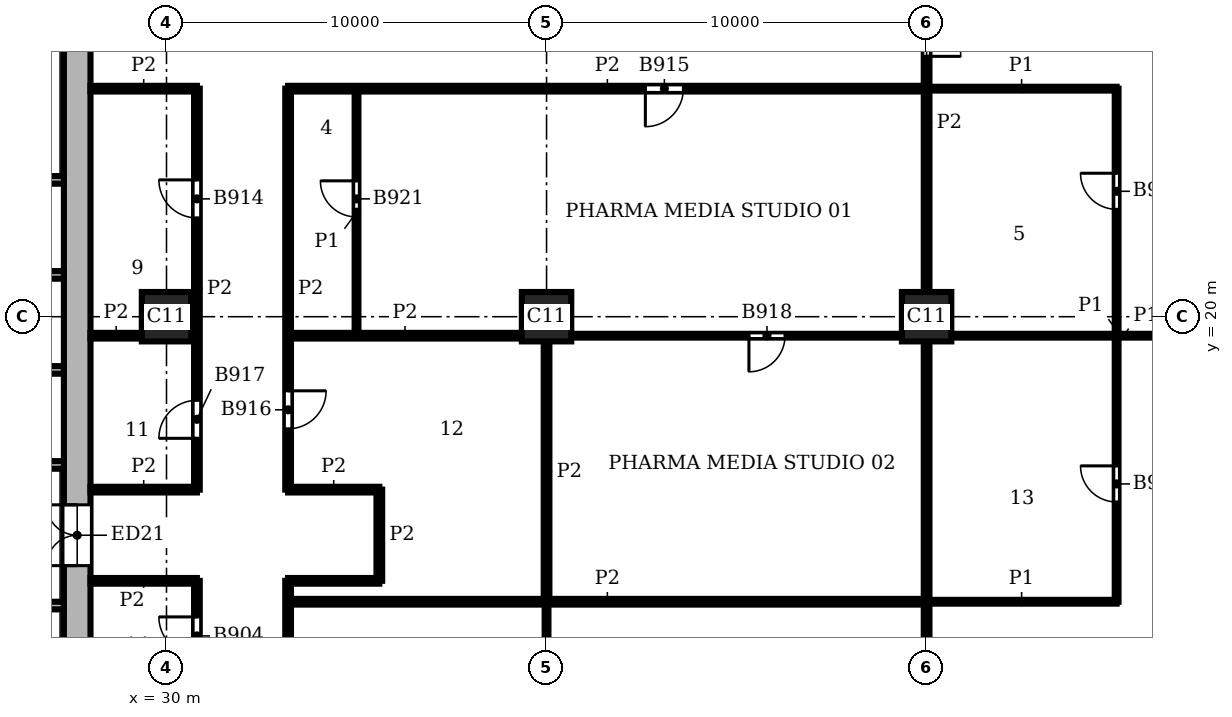
"""IFC4 building model, lengths in metres.
Left out: names, types, materials, properties, quantities, classifications, styles, units other than length and angle.
Written with IfcOpenShell. Run it as: python <this file> out.ifc"""

import sys

from ifc_helpers import new_model, si_unit, direction, frame, frame_2d, origin, origin_2d, place, context, subcontext, project, spatial, rectangle, extrude, element, fill, save


model = new_model("IFC4")
c1 = context("Model", 3, precision=1e-05, world=origin(), true_north=direction((0.0, 1.0)))
c2 = subcontext(c1, "Body", "Model", "MODEL_VIEW")
j1 = project(units=[si_unit("LENGTHUNIT", "METRE"), si_unit("PLANEANGLEUNIT", "RADIAN")], contexts=[c1])
p1 = place(None, origin())
s1 = spatial("IfcSite", under=j1, at=p1, CompositionType="ELEMENT")
p2 = place(p1, origin())
s2 = spatial("IfcBuilding", under=s1, at=p2, CompositionType="ELEMENT")
p3 = place(p2, frame((0.0, 0.0, 233.1)))
s3 = spatial("IfcBuildingStorey", under=s2, at=p3, CompositionType="ELEMENT", Elevation=233.1)
for number, where, z_axis, x_axis in (
    (1, (30.0, 20.0, 0.0), (0.0, 0.0, 1.0), (1.0, 0.0, 0.0)),
    (2, (40.0, 20.0, 0.0), (0.0, 0.0, 1.0), (1.0, 0.0, 0.0)),
    (3, (50.0, 20.0, 0.0), (0.0, 0.0, 1.0), (1.0, 0.0, 0.0)),
):
    element("IfcColumn", number, at=place(p3, frame(where, z_axis=z_axis, x_axis=x_axis)), inside=s3, PredefinedType="COLUMN", context=c2, shape_type="SweptSolid", body=[
        extrude(rectangle(XDim=1.3, YDim=1.3, at=origin_2d()), origin(), (0.0, 0.0, 1.0), 3.9),
    ])
p4 = place(p3, frame((27.65, 8.7, 0.0), z_axis=(0.0, 0.0, 1.0), x_axis=(0.0, 1.0, 0.0)))
e4 = element("IfcWall", 4, at=p4, inside=s3, PredefinedType="SHEAR", context=c2, shape_type="SweptSolid", body=[
    extrude(rectangle(XDim=18.6, YDim=0.7, at=frame_2d((9.3, 0.0))), origin(), (0.0, 0.0, 1.0), 3.9),
])
p5 = place(p4, frame((4.75, 0.0, 0.0)))
e5 = element("IfcOpeningElement", 5, at=p5, cuts=e4, PredefinedType="OPENING", context=c2, shape_type="SweptSolid", body=[
    extrude(rectangle(XDim=1.6, YDim=2.1, at=frame_2d((0.8, 1.05))), frame((0.0, 0.36, 0.0), z_axis=(0.0, -1.0, 0.0), x_axis=(1.0, 0.0, 0.0)), (0.0, 0.0, 1.0), 0.72),
])
p6 = place(p3, frame((13.8, 12.4, 0.0), z_axis=(0.0, 0.0, 1.0), x_axis=(1.0, 0.0, 0.0)))
e6 = element("IfcWall", 6, at=p6, inside=s3, PredefinedType="SHEAR", context=c2, shape_type="SweptSolid", body=[
    extrude(rectangle(XDim=13.5, YDim=0.2, at=frame_2d((6.75, 0.0))), origin(), (0.0, 0.0, 1.0), 3.45),
])
p7 = place(p6, frame((2.4, 0.0, 0.0)))
e7 = element("IfcOpeningElement", 7, at=p7, cuts=e6, PredefinedType="OPENING", context=c2, shape_type="SweptSolid", body=[
    extrude(rectangle(XDim=1.1, YDim=2.1, at=frame_2d((0.55, 1.05))), frame((0.0, 0.11, 0.0), z_axis=(0.0, -1.0, 0.0), x_axis=(1.0, 0.0, 0.0)), (0.0, 0.0, 1.0), 0.22),
])
p8 = place(p6, frame((4.9, 0.0, 0.0)))
e8 = element("IfcOpeningElement", 8, at=p8, cuts=e6, PredefinedType="OPENING", context=c2, shape_type="SweptSolid", body=[
    extrude(rectangle(XDim=1.1, YDim=2.1, at=frame_2d((0.55, 1.05))), frame((0.0, 0.11, 0.0), z_axis=(0.0, -1.0, 0.0), x_axis=(1.0, 0.0, 0.0)), (0.0, 0.0, 1.0), 0.22),
])
p9 = place(p6, frame((0.2, 0.0, 0.0)))
e9 = element("IfcOpeningElement", 9, at=p9, cuts=e6, PredefinedType="OPENING", context=c2, shape_type="SweptSolid", body=[
    extrude(rectangle(XDim=1.0, YDim=2.1, at=frame_2d((0.5, 1.05))), frame((0.0, 0.11, 0.0), z_axis=(0.0, -1.0, 0.0), x_axis=(1.0, 0.0, 0.0)), (0.0, 0.0, 1.0), 0.22),
])
for number, where, z_axis, x_axis in (
    (10, (24.3, 16.1, 0.0), (0.0, 0.0, 1.0), (1.0, 0.0, 0.0)),
    (11, (24.3, 18.6, 0.0), (0.0, 0.0, 1.0), (1.0, 0.0, 0.0)),
    (12, (24.3, 21.1, 0.0), (0.0, 0.0, 1.0), (1.0, 0.0, 0.0)),
):
    element("IfcWall", number, at=place(p3, frame(where, z_axis=z_axis, x_axis=x_axis)), inside=s3, PredefinedType="SHEAR", context=c2, shape_type="SweptSolid", body=[
        extrude(rectangle(XDim=3.0, YDim=0.2, at=frame_2d((1.5, 0.0))), origin(), (0.0, 0.0, 1.0), 3.45),
    ])
p10 = place(p3, frame((13.8, 23.6, 0.0), z_axis=(0.0, 0.0, 1.0), x_axis=(1.0, 0.0, 0.0)))
e13 = element("IfcWall", 13, at=p10, inside=s3, PredefinedType="SHEAR", context=c2, shape_type="SweptSolid", body=[
    extrude(rectangle(XDim=13.5, YDim=0.2, at=frame_2d((6.75, 0.0))), origin(), (0.0, 0.0, 1.0), 3.45),
])
p11 = place(p10, frame((2.4, 0.0, 0.0)))
e14 = element("IfcOpeningElement", 14, at=p11, cuts=e13, PredefinedType="OPENING", context=c2, shape_type="SweptSolid", body=[
    extrude(rectangle(XDim=1.1, YDim=2.1, at=frame_2d((0.55, 1.05))), frame((0.0, 0.11, 0.0), z_axis=(0.0, -1.0, 0.0), x_axis=(1.0, 0.0, 0.0)), (0.0, 0.0, 1.0), 0.22),
])
p12 = place(p10, frame((4.9, 0.0, 0.0)))
e15 = element("IfcOpeningElement", 15, at=p12, cuts=e13, PredefinedType="OPENING", context=c2, shape_type="SweptSolid", body=[
    extrude(rectangle(XDim=1.1, YDim=2.1, at=frame_2d((0.55, 1.05))), frame((0.0, 0.11, 0.0), z_axis=(0.0, -1.0, 0.0), x_axis=(1.0, 0.0, 0.0)), (0.0, 0.0, 1.0), 0.22),
])
p13 = place(p10, frame((0.2, 0.0, 0.0)))
e16 = element("IfcOpeningElement", 16, at=p13, cuts=e13, PredefinedType="OPENING", context=c2, shape_type="SweptSolid", body=[
    extrude(rectangle(XDim=1.0, YDim=2.1, at=frame_2d((0.5, 1.05))), frame((0.0, 0.11, 0.0), z_axis=(0.0, -1.0, 0.0), x_axis=(1.0, 0.0, 0.0)), (0.0, 0.0, 1.0), 0.22),
])
p14 = place(p3, frame((35.0, 19.5, 0.0), z_axis=(0.0, 0.0, 1.0), x_axis=(0.0, 1.0, 0.0)))
e17 = element("IfcWall", 17, at=p14, inside=s3, PredefinedType="PARTITIONING", context=c2, shape_type="SweptSolid", body=[
    extrude(rectangle(XDim=6.5, YDim=0.1, at=frame_2d((3.25, 0.0))), origin(), (0.0, 0.0, 1.0), 3.45),
])
p15 = place(p14, frame((3.125, 0.0, 0.0)))
e18 = element("IfcOpeningElement", 18, at=p15, cuts=e17, PredefinedType="OPENING", context=c2, shape_type="SweptSolid", body=[
    extrude(rectangle(XDim=0.95, YDim=2.1, at=frame_2d((0.475, 1.05))), frame((0.0, 0.06, 0.0), z_axis=(0.0, -1.0, 0.0), x_axis=(1.0, 0.0, 0.0)), (0.0, 0.0, 1.0), 0.12),
])
p16 = place(p3, frame((40.0, 10.65, 0.0), z_axis=(0.0, 0.0, 1.0), x_axis=(0.0, 1.0, 0.0)))
e19 = element("IfcWall", 19, at=p16, inside=s3, PredefinedType="PARTITIONING", context=c2, shape_type="SweptSolid", body=[
    extrude(rectangle(XDim=1.85, YDim=0.1, at=frame_2d((0.925, 0.0))), origin(), (0.0, 0.0, 1.0), 3.45),
])
p17 = place(p3, frame((55.0, 12.5, 0.0), z_axis=(0.0, 0.0, 1.0), x_axis=(0.0, 1.0, 0.0)))
e20 = element("IfcWall", 20, at=p17, inside=s3, PredefinedType="PARTITIONING", context=c2, shape_type="SweptSolid", body=[
    extrude(rectangle(XDim=13.5, YDim=0.1, at=frame_2d((6.75, 0.0))), origin(), (0.0, 0.0, 1.0), 3.45),
])
p18 = place(p17, frame((10.325, 0.0, 0.0)))
e21 = element("IfcOpeningElement", 21, at=p18, cuts=e20, PredefinedType="OPENING", context=c2, shape_type="SweptSolid", body=[
    extrude(rectangle(XDim=0.95, YDim=2.1, at=frame_2d((0.475, 1.05))), frame((0.0, 0.06, 0.0), z_axis=(0.0, -1.0, 0.0), x_axis=(1.0, 0.0, 0.0)), (0.0, 0.0, 1.0), 0.12),
])
p19 = place(p17, frame((2.625, 0.0, 0.0)))
e22 = element("IfcOpeningElement", 22, at=p19, cuts=e20, PredefinedType="OPENING", context=c2, shape_type="SweptSolid", body=[
    extrude(rectangle(XDim=0.95, YDim=2.1, at=frame_2d((0.475, 1.05))), frame((0.0, 0.06, 0.0), z_axis=(0.0, -1.0, 0.0), x_axis=(1.0, 0.0, 0.0)), (0.0, 0.0, 1.0), 0.12),
])
p20 = place(p3, frame((50.0, 12.5, 0.0), z_axis=(0.0, 0.0, 1.0), x_axis=(1.0, 0.0, 0.0)))
e23 = element("IfcWall", 23, at=p20, inside=s3, PredefinedType="PARTITIONING", context=c2, shape_type="SweptSolid", body=[
    extrude(rectangle(XDim=5.0, YDim=0.1, at=frame_2d((2.5, 0.0))), origin(), (0.0, 0.0, 1.0), 3.45),
])
p21 = place(p3, frame((40.65, 19.5, 0.0), z_axis=(0.0, 0.0, 1.0), x_axis=(1.0, 0.0, 0.0)))
e24 = element("IfcWall", 24, at=p21, inside=s3, PredefinedType="PARTITIONING", context=c2, shape_type="SweptSolid", body=[
    extrude(rectangle(XDim=8.7, YDim=0.1, at=frame_2d((4.35, 0.0))), origin(), (0.0, 0.0, 1.0), 3.45),
])
p22 = place(p21, frame((4.675, 0.0, 0.0)))
e25 = element("IfcOpeningElement", 25, at=p22, cuts=e24, PredefinedType="OPENING", context=c2, shape_type="SweptSolid", body=[
    extrude(rectangle(XDim=0.95, YDim=2.1, at=frame_2d((0.475, 1.05))), frame((0.0, 0.06, 0.0), z_axis=(0.0, -1.0, 0.0), x_axis=(1.0, 0.0, 0.0)), (0.0, 0.0, 1.0), 0.12),
])
p23 = place(p3, frame((50.65, 19.5, 0.0), z_axis=(0.0, 0.0, 1.0), x_axis=(1.0, 0.0, 0.0)))
e26 = element("IfcWall", 26, at=p23, inside=s3, PredefinedType="PARTITIONING", context=c2, shape_type="SweptSolid", body=[
    extrude(rectangle(XDim=8.9, YDim=0.1, at=frame_2d((4.45, 0.0))), origin(), (0.0, 0.0, 1.0), 3.45),
])
p24 = place(p23, frame((6.45, 0.0, 0.0)))
e27 = element("IfcOpeningElement", 27, at=p24, cuts=e26, PredefinedType="OPENING", context=c2, shape_type="SweptSolid", body=[
    extrude(rectangle(XDim=0.9, YDim=2.1, at=frame_2d((0.45, 1.05))), frame((0.0, 0.06, 0.0), z_axis=(0.0, -1.0, 0.0), x_axis=(1.0, 0.0, 0.0)), (0.0, 0.0, 1.0), 0.12),
])
p25 = place(p3, frame((50.0, 26.0, 0.0), z_axis=(0.0, 0.0, 1.0), x_axis=(1.0, 0.0, 0.0)))
e28 = element("IfcWall", 28, at=p25, inside=s3, PredefinedType="PARTITIONING", context=c2, shape_type="SweptSolid", body=[
    extrude(rectangle(XDim=5.0, YDim=0.1, at=frame_2d((2.5, 0.0))), origin(), (0.0, 0.0, 1.0), 3.45),
])
p26 = place(p3, frame((30.8, 8.001, 0.0), z_axis=(0.0, 0.0, 1.0), x_axis=(0.0, 1.0, 0.0)))
e29 = element("IfcWall", 29, at=p26, inside=s3, PredefinedType="PARTITIONING", context=c2, shape_type="SweptSolid", body=[
    extrude(rectangle(XDim=5.048, YDim=0.15, at=frame_2d((2.524, 0.0))), origin(), (0.0, 0.0, 1.0), 3.45),
])
p27 = place(p26, frame((3.1, 0.0, 0.0)))
e30 = element("IfcOpeningElement", 30, at=p27, cuts=e29, PredefinedType="OPENING", context=c2, shape_type="SweptSolid", body=[
    extrude(rectangle(XDim=1.0, YDim=2.1, at=frame_2d((0.5, 1.05))), frame((0.0, 0.085, 0.0), z_axis=(0.0, -1.0, 0.0), x_axis=(1.0, 0.0, 0.0)), (0.0, 0.0, 1.0), 0.17),
])
p28 = place(p3, frame((30.8, 15.45, 0.0), z_axis=(0.0, 0.0, 1.0), x_axis=(0.0, 1.0, 0.0)))
e31 = element("IfcWall", 31, at=p28, inside=s3, PredefinedType="PARTITIONING", context=c2, shape_type="SweptSolid", body=[
    extrude(rectangle(XDim=10.55, YDim=0.15, at=frame_2d((5.275, 0.0))), origin(), (0.0, 0.0, 1.0), 3.45),
])
p29 = place(p28, frame((7.15, 0.0, 0.0)))
e32 = element("IfcOpeningElement", 32, at=p29, cuts=e31, PredefinedType="OPENING", context=c2, shape_type="SweptSolid", body=[
    extrude(rectangle(XDim=1.0, YDim=2.1, at=frame_2d((0.5, 1.05))), frame((0.0, 0.085, 0.0), z_axis=(0.0, -1.0, 0.0), x_axis=(1.0, 0.0, 0.0)), (0.0, 0.0, 1.0), 0.17),
])
p30 = place(p28, frame((1.35, 0.0, 0.0)))
e33 = element("IfcOpeningElement", 33, at=p30, cuts=e31, PredefinedType="OPENING", context=c2, shape_type="SweptSolid", body=[
    extrude(rectangle(XDim=1.0, YDim=2.1, at=frame_2d((0.5, 1.05))), frame((0.0, 0.085, 0.0), z_axis=(0.0, -1.0, 0.0), x_axis=(1.0, 0.0, 0.0)), (0.0, 0.0, 1.0), 0.17),
])
p31 = place(p3, frame((33.2, 8.0, 0.0), z_axis=(0.0, 0.0, 1.0), x_axis=(0.0, 1.0, 0.0)))
e34 = element("IfcWall", 34, at=p31, inside=s3, PredefinedType="PARTITIONING", context=c2, shape_type="SweptSolid", body=[
    extrude(rectangle(XDim=5.05, YDim=0.15, at=frame_2d((2.525, 0.0))), origin(), (0.0, 0.0, 1.0), 3.45),
])
p32 = place(p3, frame((33.2, 15.45, 0.0), z_axis=(0.0, 0.0, 1.0), x_axis=(0.0, 1.0, 0.0)))
e35 = element("IfcWall", 35, at=p32, inside=s3, PredefinedType="PARTITIONING", context=c2, shape_type="SweptSolid", body=[
    extrude(rectangle(XDim=10.55, YDim=0.15, at=frame_2d((5.275, 0.0))), origin(), (0.0, 0.0, 1.0), 3.45),
])
p33 = place(p32, frame((1.6, 0.0, 0.0)))
e36 = element("IfcOpeningElement", 36, at=p33, cuts=e35, PredefinedType="OPENING", context=c2, shape_type="SweptSolid", body=[
    extrude(rectangle(XDim=1.0, YDim=2.1, at=frame_2d((0.5, 1.05))), frame((0.0, 0.085, 0.0), z_axis=(0.0, -1.0, 0.0), x_axis=(1.0, 0.0, 0.0)), (0.0, 0.0, 1.0), 0.17),
])
p34 = place(p3, frame((35.6, 13.05, 0.0), z_axis=(0.0, 0.0, 1.0), x_axis=(0.0, 1.0, 0.0)))
e37 = element("IfcWall", 37, at=p34, inside=s3, PredefinedType="PARTITIONING", context=c2, shape_type="SweptSolid", body=[
    extrude(rectangle(XDim=2.4, YDim=0.15, at=frame_2d((1.2, 0.0))), origin(), (0.0, 0.0, 1.0), 3.45),
])
p35 = place(p3, frame((40.0, 12.5, 0.0), z_axis=(0.0, 0.0, 1.0), x_axis=(0.0, 1.0, 0.0)))
e38 = element("IfcWall", 38, at=p35, inside=s3, PredefinedType="PARTITIONING", context=c2, shape_type="SweptSolid", body=[
    extrude(rectangle(XDim=6.85, YDim=0.15, at=frame_2d((3.425, 0.0))), origin(), (0.0, 0.0, 1.0), 3.45),
])
p36 = place(p3, frame((50.0, 10.65, 0.0), z_axis=(0.0, 0.0, 1.0), x_axis=(0.0, 1.0, 0.0)))
e39 = element("IfcWall", 39, at=p36, inside=s3, PredefinedType="PARTITIONING", context=c2, shape_type="SweptSolid", body=[
    extrude(rectangle(XDim=8.7, YDim=0.15, at=frame_2d((4.35, 0.0))), origin(), (0.0, 0.0, 1.0), 3.45),
])
p37 = place(p3, frame((50.0, 20.65, 0.0), z_axis=(0.0, 0.0, 1.0), x_axis=(0.0, 1.0, 0.0)))
e40 = element("IfcWall", 40, at=p37, inside=s3, PredefinedType="PARTITIONING", context=c2, shape_type="SweptSolid", body=[
    extrude(rectangle(XDim=8.9, YDim=0.15, at=frame_2d((4.45, 0.0))), origin(), (0.0, 0.0, 1.0), 3.45),
])
p38 = place(p37, frame((6.2, 0.0, 0.0)))
e41 = element("IfcOpeningElement", 41, at=p38, cuts=e40, PredefinedType="OPENING", context=c2, shape_type="SweptSolid", body=[
    extrude(rectangle(XDim=1.8, YDim=2.1, at=frame_2d((0.9, 1.05))), frame((0.0, 0.085, 0.0), z_axis=(0.0, -1.0, 0.0), x_axis=(1.0, 0.0, 0.0)), (0.0, 0.0, 1.0), 0.17),
])
p39 = place(p3, frame((33.2, 12.5, 0.0), z_axis=(0.0, 0.0, 1.0), x_axis=(1.0, 0.0, 0.0)))
e42 = element("IfcWall", 42, at=p39, inside=s3, PredefinedType="PARTITIONING", context=c2, shape_type="SweptSolid", body=[
    extrude(rectangle(XDim=16.8, YDim=0.15, at=frame_2d((8.4, 0.0))), origin(), (0.0, 0.0, 1.0), 3.45),
])
p40 = place(p3, frame((28.0, 13.05, 0.0), z_axis=(0.0, 0.0, 1.0), x_axis=(1.0, 0.0, 0.0)))
e43 = element("IfcWall", 43, at=p40, inside=s3, PredefinedType="PARTITIONING", context=c2, shape_type="SweptSolid", body=[
    extrude(rectangle(XDim=2.799, YDim=0.15, at=frame_2d((1.399, 0.0))), origin(), (0.0, 0.0, 1.0), 3.45),
])
p41 = place(p3, frame((33.2, 13.05, 0.0), z_axis=(0.0, 0.0, 1.0), x_axis=(1.0, 0.0, 0.0)))
e44 = element("IfcWall", 44, at=p41, inside=s3, PredefinedType="PARTITIONING", context=c2, shape_type="SweptSolid", body=[
    extrude(rectangle(XDim=2.4, YDim=0.15, at=frame_2d((1.2, 0.0))), origin(), (0.0, 0.0, 1.0), 3.45),
])
p42 = place(p3, frame((28.0, 15.45, 0.0), z_axis=(0.0, 0.0, 1.0), x_axis=(1.0, 0.0, 0.0)))
e45 = element("IfcWall", 45, at=p42, inside=s3, PredefinedType="PARTITIONING", context=c2, shape_type="SweptSolid", body=[
    extrude(rectangle(XDim=2.8, YDim=0.15, at=frame_2d((1.4, 0.0))), origin(), (0.0, 0.0, 1.0), 3.45),
])
p43 = place(p3, frame((33.2, 15.45, 0.0), z_axis=(0.0, 0.0, 1.0), x_axis=(1.0, 0.0, 0.0)))
e46 = element("IfcWall", 46, at=p43, inside=s3, PredefinedType="PARTITIONING", context=c2, shape_type="SweptSolid", body=[
    extrude(rectangle(XDim=2.4, YDim=0.15, at=frame_2d((1.2, 0.0))), origin(), (0.0, 0.0, 1.0), 3.45),
])
p44 = place(p3, frame((28.0, 19.5, 0.0), z_axis=(0.0, 0.0, 1.0), x_axis=(1.0, 0.0, 0.0)))
e47 = element("IfcWall", 47, at=p44, inside=s3, PredefinedType="PARTITIONING", context=c2, shape_type="SweptSolid", body=[
    extrude(rectangle(XDim=1.35, YDim=0.15, at=frame_2d((0.675, 0.0))), origin(), (0.0, 0.0, 1.0), 3.45),
])
p45 = place(p3, frame((33.2, 19.5, 0.0), z_axis=(0.0, 0.0, 1.0), x_axis=(1.0, 0.0, 0.0)))
e48 = element("IfcWall", 48, at=p45, inside=s3, PredefinedType="PARTITIONING", context=c2, shape_type="SweptSolid", body=[
    extrude(rectangle(XDim=6.15, YDim=0.15, at=frame_2d((3.075, 0.0))), origin(), (0.0, 0.0, 1.0), 3.45),
])
p46 = place(p3, frame((28.0, 26.0, 0.0), z_axis=(0.0, 0.0, 1.0), x_axis=(1.0, 0.0, 0.0)))
e49 = element("IfcWall", 49, at=p46, inside=s3, PredefinedType="PARTITIONING", context=c2, shape_type="SweptSolid", body=[
    extrude(rectangle(XDim=2.8, YDim=0.15, at=frame_2d((1.4, 0.0))), origin(), (0.0, 0.0, 1.0), 3.45),
])
p47 = place(p3, frame((33.2, 26.0, 0.0), z_axis=(0.0, 0.0, 1.0), x_axis=(1.0, 0.0, 0.0)))
e50 = element("IfcWall", 50, at=p47, inside=s3, PredefinedType="PARTITIONING", context=c2, shape_type="SweptSolid", body=[
    extrude(rectangle(XDim=16.8, YDim=0.15, at=frame_2d((8.4, 0.0))), origin(), (0.0, 0.0, 1.0), 3.45),
])
p48 = place(p47, frame((9.4, 0.0, 0.0)))
e51 = element("IfcOpeningElement", 51, at=p48, cuts=e50, PredefinedType="OPENING", context=c2, shape_type="SweptSolid", body=[
    extrude(rectangle(XDim=1.0, YDim=2.1, at=frame_2d((0.5, 1.05))), frame((0.0, 0.085, 0.0), z_axis=(0.0, -1.0, 0.0), x_axis=(1.0, 0.0, 0.0)), (0.0, 0.0, 1.0), 0.17),
])
p49 = place(p5, origin())
e52 = element("IfcDoor", 52, at=p49, inside=s3, OperationType="DOUBLE_DOOR_SINGLE_SWING", PredefinedType="DOOR", context=c2, shape_type="SweptSolid", body=[
    extrude(rectangle(XDim=1.6, YDim=2.1, at=frame_2d((0.8, 1.05))), frame((0.0, 0.025, 0.0), z_axis=(0.0, -1.0, 0.0), x_axis=(1.0, 0.0, 0.0)), (0.0, 0.0, 1.0), 0.05),
])
fill(e5, e52)
p50 = place(p27, origin())
e53 = element("IfcDoor", 53, at=p50, inside=s3, OperationType="SINGLE_SWING_RIGHT", PredefinedType="DOOR", context=c2, shape_type="SweptSolid", body=[
    extrude(rectangle(XDim=1.0, YDim=2.1, at=frame_2d((0.5, 1.05))), frame((0.0, 0.025, 0.0), z_axis=(0.0, -1.0, 0.0), x_axis=(1.0, 0.0, 0.0)), (0.0, 0.0, 1.0), 0.05),
])
fill(e30, e53)
p51 = place(p38, frame((1.8, 0.0, 0.0), z_axis=(0.0, 0.0, 1.0), x_axis=(-1.0, 0.0, 0.0)))
e54 = element("IfcDoor", 54, at=p51, inside=s3, OperationType="DOUBLE_DOOR_SINGLE_SWING", PredefinedType="DOOR", context=c2, shape_type="SweptSolid", body=[
    extrude(rectangle(XDim=1.8, YDim=2.1, at=frame_2d((0.9, 1.05))), frame((0.0, 0.025, 0.0), z_axis=(0.0, -1.0, 0.0), x_axis=(1.0, 0.0, 0.0)), (0.0, 0.0, 1.0), 0.05),
])
fill(e41, e54)
p52 = place(p29, origin())
e55 = element("IfcDoor", 55, at=p52, inside=s3, OperationType="SINGLE_SWING_RIGHT", PredefinedType="DOOR", context=c2, shape_type="SweptSolid", body=[
    extrude(rectangle(XDim=1.0, YDim=2.1, at=frame_2d((0.5, 1.05))), frame((0.0, 0.025, 0.0), z_axis=(0.0, -1.0, 0.0), x_axis=(1.0, 0.0, 0.0)), (0.0, 0.0, 1.0), 0.05),
])
fill(e32, e55)
p53 = place(p48, frame((1.0, 0.0, 0.0), z_axis=(0.0, 0.0, 1.0), x_axis=(-1.0, 0.0, 0.0)))
e56 = element("IfcDoor", 56, at=p53, inside=s3, OperationType="SINGLE_SWING_RIGHT", PredefinedType="DOOR", context=c2, shape_type="SweptSolid", body=[
    extrude(rectangle(XDim=1.0, YDim=2.1, at=frame_2d((0.5, 1.05))), frame((0.0, 0.025, 0.0), z_axis=(0.0, -1.0, 0.0), x_axis=(1.0, 0.0, 0.0)), (0.0, 0.0, 1.0), 0.05),
])
fill(e51, e56)
p54 = place(p33, frame((1.0, 0.0, 0.0), z_axis=(0.0, 0.0, 1.0), x_axis=(-1.0, 0.0, 0.0)))
e57 = element("IfcDoor", 57, at=p54, inside=s3, OperationType="SINGLE_SWING_LEFT", PredefinedType="DOOR", context=c2, shape_type="SweptSolid", body=[
    extrude(rectangle(XDim=1.0, YDim=2.1, at=frame_2d((0.5, 1.05))), frame((0.0, 0.025, 0.0), z_axis=(0.0, -1.0, 0.0), x_axis=(1.0, 0.0, 0.0)), (0.0, 0.0, 1.0), 0.05),
])
fill(e36, e57)
p55 = place(p30, origin())
e58 = element("IfcDoor", 58, at=p55, inside=s3, OperationType="SINGLE_SWING_LEFT", PredefinedType="DOOR", context=c2, shape_type="SweptSolid", body=[
    extrude(rectangle(XDim=1.0, YDim=2.1, at=frame_2d((0.5, 1.05))), frame((0.0, 0.025, 0.0), z_axis=(0.0, -1.0, 0.0), x_axis=(1.0, 0.0, 0.0)), (0.0, 0.0, 1.0), 0.05),
])
fill(e33, e58)
p56 = place(p22, frame((0.95, 0.0, 0.0), z_axis=(0.0, 0.0, 1.0), x_axis=(-1.0, 0.0, 0.0)))
e59 = element("IfcDoor", 59, at=p56, inside=s3, OperationType="SINGLE_SWING_RIGHT", PredefinedType="DOOR", context=c2, shape_type="SweptSolid", body=[
    extrude(rectangle(XDim=0.95, YDim=2.1, at=frame_2d((0.475, 1.05))), frame((0.0, 0.025, 0.0), z_axis=(0.0, -1.0, 0.0), x_axis=(1.0, 0.0, 0.0)), (0.0, 0.0, 1.0), 0.05),
])
fill(e25, e59)
p57 = place(p15, origin())
e60 = element("IfcDoor", 60, at=p57, inside=s3, OperationType="SINGLE_SWING_RIGHT", PredefinedType="DOOR", context=c2, shape_type="SweptSolid", body=[
    extrude(rectangle(XDim=0.95, YDim=2.1, at=frame_2d((0.475, 1.05))), frame((0.0, 0.025, 0.0), z_axis=(0.0, -1.0, 0.0), x_axis=(1.0, 0.0, 0.0)), (0.0, 0.0, 1.0), 0.05),
])
fill(e18, e60)
p58 = place(p18, origin())
e61 = element("IfcDoor", 61, at=p58, inside=s3, OperationType="SINGLE_SWING_RIGHT", PredefinedType="DOOR", context=c2, shape_type="SweptSolid", body=[
    extrude(rectangle(XDim=0.95, YDim=2.1, at=frame_2d((0.475, 1.05))), frame((0.0, 0.025, 0.0), z_axis=(0.0, -1.0, 0.0), x_axis=(1.0, 0.0, 0.0)), (0.0, 0.0, 1.0), 0.05),
])
fill(e21, e61)
p59 = place(p19, origin())
e62 = element("IfcDoor", 62, at=p59, inside=s3, OperationType="SINGLE_SWING_RIGHT", PredefinedType="DOOR", context=c2, shape_type="SweptSolid", body=[
    extrude(rectangle(XDim=0.95, YDim=2.1, at=frame_2d((0.475, 1.05))), frame((0.0, 0.025, 0.0), z_axis=(0.0, -1.0, 0.0), x_axis=(1.0, 0.0, 0.0)), (0.0, 0.0, 1.0), 0.05),
])
fill(e22, e62)
save(model, sys.argv[1])
